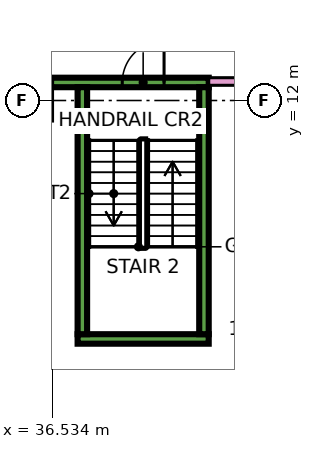
"""IFC4 building model, lengths in metres.
Left out: names, types, materials, properties, quantities, classifications, styles, units other than length and angle.
Written with IfcOpenShell. Run it as: python <this file> out.ifc"""

import sys

from ifc_helpers import new_model, si_unit, direction, frame, frame_2d, origin, place, context, subcontext, project, spatial, rectangle, extrude, element, fill, save


model = new_model("IFC4")
c1 = context("Model", 3, precision=1e-05, world=origin(), true_north=direction((0.0, 1.0)))
c2 = subcontext(c1, "Body", "Model", "MODEL_VIEW")
j1 = project(units=[si_unit("LENGTHUNIT", "METRE"), si_unit("PLANEANGLEUNIT", "RADIAN")], contexts=[c1])
p1 = place(None, origin())
s1 = spatial("IfcSite", under=j1, at=p1, CompositionType="ELEMENT")
p2 = place(p1, origin())
s2 = spatial("IfcBuilding", under=s1, at=p2, CompositionType="ELEMENT")
p3 = place(p2, frame((0.0, 0.0, 91.9)))
s3 = spatial("IfcBuildingStorey", under=s2, at=p3, CompositionType="ELEMENT", Elevation=91.9)
p4 = place(p3, frame((37.2, 5.725, 0.0), z_axis=(0.0, 0.0, 1.0), x_axis=(1.0, 0.0, 0.0)))
e1 = element("IfcWall", 1, at=p4, inside=s3, PredefinedType="SHEAR", context=c2, shape_type="SweptSolid", body=[
    extrude(rectangle(XDim=3.45, YDim=0.25, at=frame_2d((1.725, 0.0))), origin(), (0.0, 0.0, 1.0), 3.75),
])
p5 = place(p3, frame((36.5, 12.475, 0.0), z_axis=(0.0, 0.0, 1.0), x_axis=(1.0, 0.0, 0.0)))
e2 = element("IfcWall", 2, at=p5, inside=s3, PredefinedType="SHEAR", context=c2, shape_type="SweptSolid", body=[
    extrude(rectangle(XDim=4.15, YDim=0.25, at=frame_2d((2.075, 0.0))), origin(), (0.0, 0.0, 1.0), 3.75),
])
p6 = place(p5, frame((1.875, 0.0, 0.0)))
e3 = element("IfcOpeningElement", 3, at=p6, cuts=e2, PredefinedType="OPENING", context=c2, shape_type="SweptSolid", body=[
    extrude(rectangle(XDim=1.1, YDim=2.2, at=frame_2d((0.55, 1.1))), frame((0.0, 0.135, 0.0), z_axis=(0.0, -1.0, 0.0), x_axis=(1.0, 0.0, 0.0)), (0.0, 0.0, 1.0), 0.27),
])
for number, where, z_axis, x_axis in (
    (4, (37.325, 5.85, 0.0), (0.0, 0.0, 1.0), (0.0, 1.0, 0.0)),
    (5, (40.525, 5.85, 0.0), (0.0, 0.0, 1.0), (0.0, 1.0, 0.0)),
):
    element("IfcWall", number, at=place(p3, frame(where, z_axis=z_axis, x_axis=x_axis)), inside=s3, PredefinedType="SHEAR", context=c2, shape_type="SweptSolid", body=[
        extrude(rectangle(XDim=6.5, YDim=0.25, at=frame_2d((3.25, 0.0))), origin(), (0.0, 0.0, 1.0), 3.75),
    ])
p7 = place(p3, frame((40.65, 12.5, 0.0), z_axis=(0.0, 0.0, 1.0), x_axis=(1.0, 0.0, 0.0)))
e6 = element("IfcWall", 6, at=p7, inside=s3, PredefinedType="PARTITIONING", context=c2, shape_type="SweptSolid", body=[
    extrude(rectangle(XDim=24.825, YDim=0.2, at=frame_2d((12.413, 0.0))), origin(), (0.0, 0.0, 1.0), 3.35),
])
p8 = place(p7, frame((8.4, 0.0, 0.0)))
e7 = element("IfcOpeningElement", 7, at=p8, cuts=e6, PredefinedType="OPENING", context=c2, shape_type="SweptSolid", body=[
    extrude(rectangle(XDim=1.0, YDim=2.1, at=frame_2d((0.5, 1.05))), frame((0.0, 0.11, 0.0), z_axis=(0.0, -1.0, 0.0), x_axis=(1.0, 0.0, 0.0)), (0.0, 0.0, 1.0), 0.22),
])
p9 = place(p7, frame((1.05, 0.0, 0.0)))
e8 = element("IfcOpeningElement", 8, at=p9, cuts=e6, PredefinedType="OPENING", context=c2, shape_type="SweptSolid", body=[
    extrude(rectangle(XDim=1.0, YDim=2.1, at=frame_2d((0.5, 1.05))), frame((0.0, 0.11, 0.0), z_axis=(0.0, -1.0, 0.0), x_axis=(1.0, 0.0, 0.0)), (0.0, 0.0, 1.0), 0.22),
])
p10 = place(p6, frame((1.1, 0.0, 0.0), z_axis=(0.0, 0.0, 1.0), x_axis=(-1.0, 0.0, 0.0)))
e9 = element("IfcDoor", 9, at=p10, inside=s3, OperationType="SINGLE_SWING_RIGHT", PredefinedType="DOOR", context=c2, shape_type="SweptSolid", body=[
    extrude(rectangle(XDim=1.1, YDim=2.2, at=frame_2d((0.55, 1.1))), frame((0.0, 0.025, 0.0), z_axis=(0.0, -1.0, 0.0), x_axis=(1.0, 0.0, 0.0)), (0.0, 0.0, 1.0), 0.05),
])
fill(e3, e9)
save(model, sys.argv[1])
